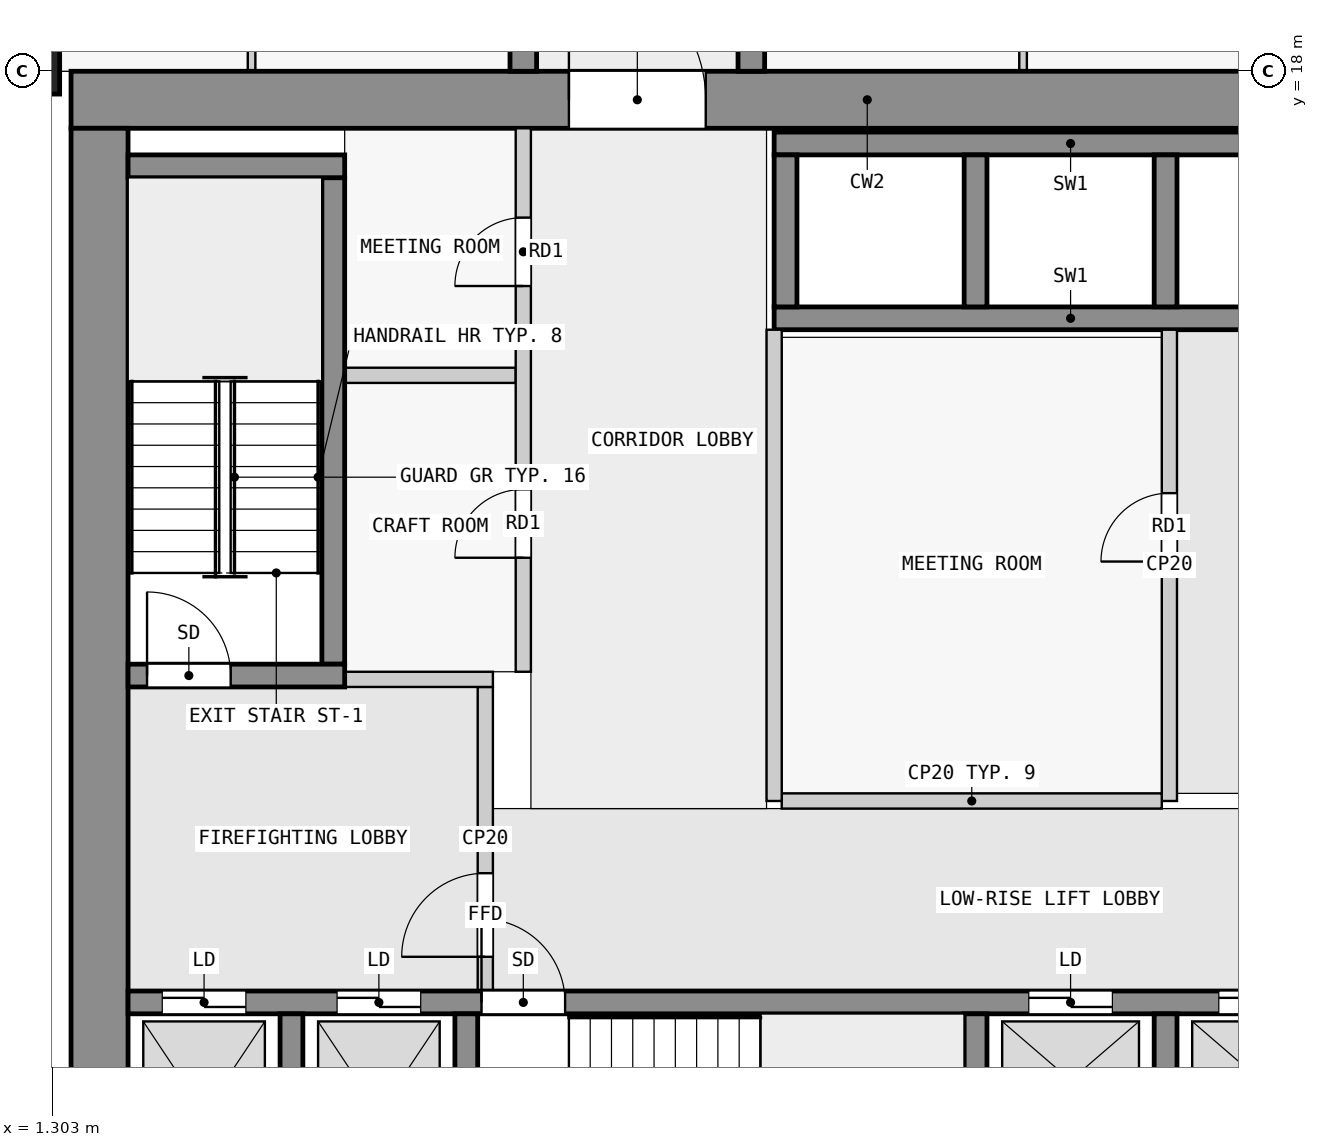
"""IFC4 building model, lengths in metres.
Left out: names, types, materials, properties, quantities, classifications, styles, units other than length and angle.
Written with IfcOpenShell. Run it as: python <this file> out.ifc"""

import sys

from ifc_helpers import new_model, si_unit, direction, frame, frame_2d, origin, origin_2d, place, context, subcontext, project, spatial, rectangle, extrude, element, fill, save


model = new_model("IFC4")
c1 = context("Model", 3, precision=1e-05, world=origin(), true_north=direction((0.0, 1.0)))
c2 = subcontext(c1, "Body", "Model", "MODEL_VIEW")
j1 = project(units=[si_unit("LENGTHUNIT", "METRE"), si_unit("PLANEANGLEUNIT", "RADIAN")], contexts=[c1])
p1 = place(None, origin())
s1 = spatial("IfcSite", under=j1, at=p1, CompositionType="ELEMENT")
p2 = place(p1, origin())
s2 = spatial("IfcBuilding", under=s1, at=p2, CompositionType="ELEMENT")
p3 = place(p2, frame((0.0, 0.0, 51.3)))
s3 = spatial("IfcBuildingStorey", under=s2, at=p3, CompositionType="ELEMENT", Elevation=51.3)
p4 = place(p3, frame((0.7, 18.0, 0.0), z_axis=(0.0, 0.0, 1.0), x_axis=(0.0, 1.0, 0.0)))
e1 = element("IfcColumn", 1, at=p4, inside=s3, PredefinedType="COLUMN", context=c2, shape_type="SweptSolid", body=[
    extrude(rectangle(XDim=0.6, YDim=1.4, at=origin_2d()), origin(), (0.0, 0.0, 1.0), 3.5),
])
p5 = place(p3, frame((1.55, 17.625, 0.0), z_axis=(0.0, 0.0, 1.0), x_axis=(1.0, 0.0, 0.0)))
e2 = element("IfcWall", 2, at=p5, inside=s3, PredefinedType="SHEAR", context=c2, shape_type="SweptSolid", body=[
    extrude(rectangle(XDim=20.95, YDim=0.75, at=frame_2d((10.475, 0.0))), origin(), (0.0, 0.0, 1.0), 3.25),
])
p6 = place(p5, frame((6.55, 0.0, 0.0)))
e3 = element("IfcOpeningElement", 3, at=p6, cuts=e2, PredefinedType="OPENING", context=c2, shape_type="SweptSolid", body=[
    extrude(rectangle(XDim=1.8, YDim=2.1, at=frame_2d((0.9, 1.05))), frame((0.0, 0.385, 0.0), z_axis=(0.0, -1.0, 0.0), x_axis=(1.0, 0.0, 0.0)), (0.0, 0.0, 1.0), 0.77),
])
p7 = place(p3, frame((1.925, 2.5, 0.0), z_axis=(0.0, 0.0, 1.0), x_axis=(0.0, 1.0, 0.0)))
e4 = element("IfcWall", 4, at=p7, inside=s3, PredefinedType="SHEAR", context=c2, shape_type="SweptSolid", body=[
    extrude(rectangle(XDim=14.75, YDim=0.75, at=frame_2d((7.375, 0.0))), origin(), (0.0, 0.0, 1.0), 3.25),
])
for number, where, z_axis, x_axis in (
    (5, (4.45, 2.8, 0.0), (0.0, 0.0, 1.0), (0.0, 1.0, 0.0)),
    (6, (6.75, 2.8, 0.0), (0.0, 0.0, 1.0), (0.0, 1.0, 0.0)),
    (7, (13.45, 2.8, 0.0), (0.0, 0.0, 1.0), (0.0, 1.0, 0.0)),
    (8, (15.95, 2.8, 0.0), (0.0, 0.0, 1.0), (0.0, 1.0, 0.0)),
):
    element("IfcWall", number, at=place(p3, frame(where, z_axis=z_axis, x_axis=x_axis)), inside=s3, PredefinedType="SHEAR", context=c2, shape_type="SweptSolid", body=[
        extrude(rectangle(XDim=2.8, YDim=0.3, at=frame_2d((1.4, 0.0))), origin(), (0.0, 0.0, 1.0), 3.25),
    ])
p8 = place(p3, frame((2.3, 5.75, 0.0), z_axis=(0.0, 0.0, 1.0), x_axis=(1.0, 0.0, 0.0)))
e9 = element("IfcWall", 9, at=p8, inside=s3, PredefinedType="SHEAR", context=c2, shape_type="SweptSolid", body=[
    extrude(rectangle(XDim=18.8, YDim=0.3, at=frame_2d((9.4, 0.0))), origin(), (0.0, 0.0, 1.0), 3.25),
])
p9 = place(p8, frame((4.65, 0.0, 0.0)))
e10 = element("IfcOpeningElement", 10, at=p9, cuts=e9, PredefinedType="OPENING", context=c2, shape_type="SweptSolid", body=[
    extrude(rectangle(XDim=1.1, YDim=2.1, at=frame_2d((0.55, 1.05))), frame((0.0, 0.16, 0.0), z_axis=(0.0, -1.0, 0.0), x_axis=(1.0, 0.0, 0.0)), (0.0, 0.0, 1.0), 0.32),
])
p10 = place(p8, frame((0.45, 0.0, 0.0)))
e11 = element("IfcOpeningElement", 11, at=p10, cuts=e9, PredefinedType="OPENING", context=c2, shape_type="SweptSolid", body=[
    extrude(rectangle(XDim=1.1, YDim=2.1, at=frame_2d((0.55, 1.05))), frame((0.0, 0.16, 0.0), z_axis=(0.0, -1.0, 0.0), x_axis=(1.0, 0.0, 0.0)), (0.0, 0.0, 1.0), 0.32),
])
p11 = place(p8, frame((2.75, 0.0, 0.0)))
e12 = element("IfcOpeningElement", 12, at=p11, cuts=e9, PredefinedType="OPENING", context=c2, shape_type="SweptSolid", body=[
    extrude(rectangle(XDim=1.1, YDim=2.1, at=frame_2d((0.55, 1.05))), frame((0.0, 0.16, 0.0), z_axis=(0.0, -1.0, 0.0), x_axis=(1.0, 0.0, 0.0)), (0.0, 0.0, 1.0), 0.32),
])
p12 = place(p8, frame((11.85, 0.0, 0.0)))
e13 = element("IfcOpeningElement", 13, at=p12, cuts=e9, PredefinedType="OPENING", context=c2, shape_type="SweptSolid", body=[
    extrude(rectangle(XDim=1.1, YDim=2.1, at=frame_2d((0.55, 1.05))), frame((0.0, 0.16, 0.0), z_axis=(0.0, -1.0, 0.0), x_axis=(1.0, 0.0, 0.0)), (0.0, 0.0, 1.0), 0.32),
])
p13 = place(p8, frame((14.35, 0.0, 0.0)))
e14 = element("IfcOpeningElement", 14, at=p13, cuts=e9, PredefinedType="OPENING", context=c2, shape_type="SweptSolid", body=[
    extrude(rectangle(XDim=1.1, YDim=2.1, at=frame_2d((0.55, 1.05))), frame((0.0, 0.16, 0.0), z_axis=(0.0, -1.0, 0.0), x_axis=(1.0, 0.0, 0.0)), (0.0, 0.0, 1.0), 0.32),
])
p14 = place(p8, frame((16.85, 0.0, 0.0)))
e15 = element("IfcOpeningElement", 15, at=p14, cuts=e9, PredefinedType="OPENING", context=c2, shape_type="SweptSolid", body=[
    extrude(rectangle(XDim=1.1, YDim=2.1, at=frame_2d((0.55, 1.05))), frame((0.0, 0.16, 0.0), z_axis=(0.0, -1.0, 0.0), x_axis=(1.0, 0.0, 0.0)), (0.0, 0.0, 1.0), 0.32),
])
p15 = place(p3, frame((2.3, 10.05, 0.0), z_axis=(0.0, 0.0, 1.0), x_axis=(1.0, 0.0, 0.0)))
e16 = element("IfcWall", 16, at=p15, inside=s3, PredefinedType="SHEAR", context=c2, shape_type="SweptSolid", body=[
    extrude(rectangle(XDim=2.85, YDim=0.3, at=frame_2d((1.425, 0.0))), origin(), (0.0, 0.0, 1.0), 3.25),
])
p16 = place(p15, frame((0.25, 0.0, 0.0)))
e17 = element("IfcOpeningElement", 17, at=p16, cuts=e16, PredefinedType="OPENING", context=c2, shape_type="SweptSolid", body=[
    extrude(rectangle(XDim=1.1, YDim=2.1, at=frame_2d((0.55, 1.05))), frame((0.0, 0.16, 0.0), z_axis=(0.0, -1.0, 0.0), x_axis=(1.0, 0.0, 0.0)), (0.0, 0.0, 1.0), 0.32),
])
p17 = place(p3, frame((5.0, 10.2, 0.0), z_axis=(0.0, 0.0, 1.0), x_axis=(0.0, 1.0, 0.0)))
e18 = element("IfcWall", 18, at=p17, inside=s3, PredefinedType="SHEAR", context=c2, shape_type="SweptSolid", body=[
    extrude(rectangle(XDim=6.4, YDim=0.3, at=frame_2d((3.2, 0.0))), origin(), (0.0, 0.0, 1.0), 3.25),
])
p18 = place(p3, frame((2.3, 16.75, 0.0), z_axis=(0.0, 0.0, 1.0), x_axis=(1.0, 0.0, 0.0)))
e19 = element("IfcWall", 19, at=p18, inside=s3, PredefinedType="SHEAR", context=c2, shape_type="SweptSolid", body=[
    extrude(rectangle(XDim=2.85, YDim=0.3, at=frame_2d((1.425, 0.0))), origin(), (0.0, 0.0, 1.0), 3.25),
])
for number, where, z_axis, x_axis in (
    (20, (10.8, 17.05, 0.0), (0.0, 0.0, 1.0), (1.0, 0.0, 0.0)),
    (21, (10.8, 14.75, 0.0), (0.0, 0.0, 1.0), (1.0, 0.0, 0.0)),
):
    element("IfcWall", number, at=place(p3, frame(where, z_axis=z_axis, x_axis=x_axis)), inside=s3, PredefinedType="SHEAR", context=c2, shape_type="SweptSolid", body=[
        extrude(rectangle(XDim=7.8, YDim=0.3, at=frame_2d((3.9, 0.0))), origin(), (0.0, 0.0, 1.0), 3.25),
    ])
for number, where, z_axis, x_axis in (
    (22, (10.95, 14.9, 0.0), (0.0, 0.0, 1.0), (0.0, 1.0, 0.0)),
    (23, (13.45, 14.9, 0.0), (0.0, 0.0, 1.0), (0.0, 1.0, 0.0)),
    (24, (15.95, 14.9, 0.0), (0.0, 0.0, 1.0), (0.0, 1.0, 0.0)),
):
    element("IfcWall", number, at=place(p3, frame(where, z_axis=z_axis, x_axis=x_axis)), inside=s3, PredefinedType="SHEAR", context=c2, shape_type="SweptSolid", body=[
        extrude(rectangle(XDim=2.0, YDim=0.3, at=frame_2d((1.0, 0.0))), origin(), (0.0, 0.0, 1.0), 3.25),
    ])
p19 = place(p3, frame((7.5, 18.0, 0.0), z_axis=(0.0, 0.0, 1.0), x_axis=(0.0, 1.0, 0.0)))
e25 = element("IfcWall", 25, at=p19, inside=s3, PredefinedType="SHEAR", context=c2, shape_type="SweptSolid", body=[
    extrude(rectangle(XDim=27.0, YDim=0.35, at=frame_2d((13.5, 0.0))), origin(), (0.0, 0.0, 1.0), 3.25),
])
p20 = place(p19, frame((4.75, 0.0, 0.0)))
e26 = element("IfcOpeningElement", 26, at=p20, cuts=e25, PredefinedType="OPENING", context=c2, shape_type="SweptSolid", body=[
    extrude(rectangle(XDim=1.0, YDim=2.1, at=frame_2d((0.5, 1.05))), frame((0.0, 0.185, 0.0), z_axis=(0.0, -1.0, 0.0), x_axis=(1.0, 0.0, 0.0)), (0.0, 0.0, 1.0), 0.37),
])
p21 = place(p19, frame((15.25, 0.0, 0.0)))
e27 = element("IfcOpeningElement", 27, at=p21, cuts=e25, PredefinedType="OPENING", context=c2, shape_type="SweptSolid", body=[
    extrude(rectangle(XDim=1.0, YDim=2.1, at=frame_2d((0.5, 1.05))), frame((0.0, 0.185, 0.0), z_axis=(0.0, -1.0, 0.0), x_axis=(1.0, 0.0, 0.0)), (0.0, 0.0, 1.0), 0.37),
])
p22 = place(p19, frame((19.75, 0.0, 0.0)))
e28 = element("IfcOpeningElement", 28, at=p22, cuts=e25, PredefinedType="OPENING", context=c2, shape_type="SweptSolid", body=[
    extrude(rectangle(XDim=1.0, YDim=2.1, at=frame_2d((0.5, 1.05))), frame((0.0, 0.185, 0.0), z_axis=(0.0, -1.0, 0.0), x_axis=(1.0, 0.0, 0.0)), (0.0, 0.0, 1.0), 0.37),
])
p23 = place(p19, frame((23.25, 0.0, 0.0)))
e29 = element("IfcOpeningElement", 29, at=p23, cuts=e25, PredefinedType="OPENING", context=c2, shape_type="SweptSolid", body=[
    extrude(rectangle(XDim=0.9, YDim=2.1, at=frame_2d((0.45, 1.05))), frame((0.0, 0.185, 0.0), z_axis=(0.0, -1.0, 0.0), x_axis=(1.0, 0.0, 0.0)), (0.0, 0.0, 1.0), 0.37),
])
p24 = place(p19, frame((25.45, 0.0, 0.0)))
e30 = element("IfcOpeningElement", 30, at=p24, cuts=e25, PredefinedType="OPENING", context=c2, shape_type="SweptSolid", body=[
    extrude(rectangle(XDim=1.0, YDim=2.1, at=frame_2d((0.5, 1.05))), frame((0.0, 0.185, 0.0), z_axis=(0.0, -1.0, 0.0), x_axis=(1.0, 0.0, 0.0)), (0.0, 0.0, 1.0), 0.37),
])
p25 = place(p3, frame((10.5, 18.0, 0.0), z_axis=(0.0, 0.0, 1.0), x_axis=(0.0, 1.0, 0.0)))
e31 = element("IfcWall", 31, at=p25, inside=s3, PredefinedType="SHEAR", context=c2, shape_type="SweptSolid", body=[
    extrude(rectangle(XDim=27.0, YDim=0.35, at=frame_2d((13.5, 0.0))), origin(), (0.0, 0.0, 1.0), 3.25),
])
p26 = place(p25, frame((1.75, 0.0, 0.0)))
e32 = element("IfcOpeningElement", 32, at=p26, cuts=e31, PredefinedType="OPENING", context=c2, shape_type="SweptSolid", body=[
    extrude(rectangle(XDim=1.0, YDim=2.1, at=frame_2d((0.5, 1.05))), frame((0.0, 0.185, 0.0), z_axis=(0.0, -1.0, 0.0), x_axis=(1.0, 0.0, 0.0)), (0.0, 0.0, 1.0), 0.37),
])
p27 = place(p25, frame((6.25, 0.0, 0.0)))
e33 = element("IfcOpeningElement", 33, at=p27, cuts=e31, PredefinedType="OPENING", context=c2, shape_type="SweptSolid", body=[
    extrude(rectangle(XDim=1.0, YDim=2.1, at=frame_2d((0.5, 1.05))), frame((0.0, 0.185, 0.0), z_axis=(0.0, -1.0, 0.0), x_axis=(1.0, 0.0, 0.0)), (0.0, 0.0, 1.0), 0.37),
])
p28 = place(p25, frame((10.75, 0.0, 0.0)))
e34 = element("IfcOpeningElement", 34, at=p28, cuts=e31, PredefinedType="OPENING", context=c2, shape_type="SweptSolid", body=[
    extrude(rectangle(XDim=1.0, YDim=2.1, at=frame_2d((0.5, 1.05))), frame((0.0, 0.185, 0.0), z_axis=(0.0, -1.0, 0.0), x_axis=(1.0, 0.0, 0.0)), (0.0, 0.0, 1.0), 0.37),
])
p29 = place(p25, frame((15.25, 0.0, 0.0)))
e35 = element("IfcOpeningElement", 35, at=p29, cuts=e31, PredefinedType="OPENING", context=c2, shape_type="SweptSolid", body=[
    extrude(rectangle(XDim=1.0, YDim=2.1, at=frame_2d((0.5, 1.05))), frame((0.0, 0.185, 0.0), z_axis=(0.0, -1.0, 0.0), x_axis=(1.0, 0.0, 0.0)), (0.0, 0.0, 1.0), 0.37),
])
p30 = place(p25, frame((21.35, 0.0, 0.0)))
e36 = element("IfcOpeningElement", 36, at=p30, cuts=e31, PredefinedType="OPENING", context=c2, shape_type="SweptSolid", body=[
    extrude(rectangle(XDim=1.0, YDim=2.1, at=frame_2d((0.5, 1.05))), frame((0.0, 0.185, 0.0), z_axis=(0.0, -1.0, 0.0), x_axis=(1.0, 0.0, 0.0)), (0.0, 0.0, 1.0), 0.37),
])
p31 = place(p3, frame((7.0, 5.9, 0.0), z_axis=(0.0, 0.0, 1.0), x_axis=(0.0, 1.0, 0.0)))
e37 = element("IfcWall", 37, at=p31, inside=s3, PredefinedType="PARTITIONING", context=c2, shape_type="SweptSolid", body=[
    extrude(rectangle(XDim=4.0, YDim=0.2, at=frame_2d((2.0, 0.0))), origin(), (0.0, 0.0, 1.0), 3.25),
])
p32 = place(p31, frame((0.45, 0.0, 0.0)))
e38 = element("IfcOpeningElement", 38, at=p32, cuts=e37, PredefinedType="OPENING", context=c2, shape_type="SweptSolid", body=[
    extrude(rectangle(XDim=1.1, YDim=2.1, at=frame_2d((0.55, 1.05))), frame((0.0, 0.11, 0.0), z_axis=(0.0, -1.0, 0.0), x_axis=(1.0, 0.0, 0.0)), (0.0, 0.0, 1.0), 0.22),
])
p33 = place(p3, frame((5.15, 10.0, 0.0), z_axis=(0.0, 0.0, 1.0), x_axis=(1.0, 0.0, 0.0)))
e39 = element("IfcWall", 39, at=p33, inside=s3, PredefinedType="PARTITIONING", context=c2, shape_type="SweptSolid", body=[
    extrude(rectangle(XDim=1.95, YDim=0.2, at=frame_2d((0.975, 0.0))), origin(), (0.0, 0.0, 1.0), 3.25),
])
p34 = place(p3, frame((10.8, 8.4, 0.0), z_axis=(0.0, 0.0, 1.0), x_axis=(0.0, 1.0, 0.0)))
e40 = element("IfcWall", 40, at=p34, inside=s3, PredefinedType="PARTITIONING", context=c2, shape_type="SweptSolid", body=[
    extrude(rectangle(XDim=6.2, YDim=0.2, at=frame_2d((3.1, 0.0))), origin(), (0.0, 0.0, 1.0), 3.25),
])
p35 = place(p3, frame((10.9, 8.4, 0.0), z_axis=(0.0, 0.0, 1.0), x_axis=(1.0, 0.0, 0.0)))
e41 = element("IfcWall", 41, at=p35, inside=s3, PredefinedType="PARTITIONING", context=c2, shape_type="SweptSolid", body=[
    extrude(rectangle(XDim=5.0, YDim=0.2, at=frame_2d((2.5, 0.0))), origin(), (0.0, 0.0, 1.0), 3.25),
])
p36 = place(p3, frame((16.0, 8.4, 0.0), z_axis=(0.0, 0.0, 1.0), x_axis=(0.0, 1.0, 0.0)))
e42 = element("IfcWall", 42, at=p36, inside=s3, PredefinedType="PARTITIONING", context=c2, shape_type="SweptSolid", body=[
    extrude(rectangle(XDim=6.2, YDim=0.2, at=frame_2d((3.1, 0.0))), origin(), (0.0, 0.0, 1.0), 3.25),
])
p37 = place(p36, frame((3.15, 0.0, 0.0)))
e43 = element("IfcOpeningElement", 43, at=p37, cuts=e42, PredefinedType="OPENING", context=c2, shape_type="SweptSolid", body=[
    extrude(rectangle(XDim=0.9, YDim=2.1, at=frame_2d((0.45, 1.05))), frame((0.0, 0.11, 0.0), z_axis=(0.0, -1.0, 0.0), x_axis=(1.0, 0.0, 0.0)), (0.0, 0.0, 1.0), 0.22),
])
p38 = place(p3, frame((7.5, 10.1, 0.0), z_axis=(0.0, 0.0, 1.0), x_axis=(0.0, 1.0, 0.0)))
e44 = element("IfcWall", 44, at=p38, inside=s3, PredefinedType="PARTITIONING", context=c2, shape_type="SweptSolid", body=[
    extrude(rectangle(XDim=7.15, YDim=0.2, at=frame_2d((3.575, 0.0))), origin(), (0.0, 0.0, 1.0), 3.25),
])
p39 = place(p38, frame((1.5, 0.0, 0.0)))
e45 = element("IfcOpeningElement", 45, at=p39, cuts=e44, PredefinedType="OPENING", context=c2, shape_type="SweptSolid", body=[
    extrude(rectangle(XDim=0.9, YDim=2.1, at=frame_2d((0.45, 1.05))), frame((0.0, 0.11, 0.0), z_axis=(0.0, -1.0, 0.0), x_axis=(1.0, 0.0, 0.0)), (0.0, 0.0, 1.0), 0.22),
])
p40 = place(p38, frame((5.075, 0.0, 0.0)))
e46 = element("IfcOpeningElement", 46, at=p40, cuts=e44, PredefinedType="OPENING", context=c2, shape_type="SweptSolid", body=[
    extrude(rectangle(XDim=0.9, YDim=2.1, at=frame_2d((0.45, 1.05))), frame((0.0, 0.11, 0.0), z_axis=(0.0, -1.0, 0.0), x_axis=(1.0, 0.0, 0.0)), (0.0, 0.0, 1.0), 0.22),
])
p41 = place(p3, frame((5.15, 14.0, 0.0), z_axis=(0.0, 0.0, 1.0), x_axis=(1.0, 0.0, 0.0)))
e47 = element("IfcWall", 47, at=p41, inside=s3, PredefinedType="PARTITIONING", context=c2, shape_type="SweptSolid", body=[
    extrude(rectangle(XDim=2.25, YDim=0.2, at=frame_2d((1.125, 0.0))), origin(), (0.0, 0.0, 1.0), 3.25),
])
p42 = place(p3, frame((3.925, 18.0, 0.0), z_axis=(0.0, 0.0, 1.0), x_axis=(0.0, 1.0, 0.0)))
e48 = element("IfcWall", 48, at=p42, inside=s3, PredefinedType="PARTITIONING", context=c2, shape_type="SweptSolid", body=[
    extrude(rectangle(XDim=9.0, YDim=0.1, at=frame_2d((4.5, 0.0))), origin(), (0.0, 0.0, 1.0), 3.25),
])
p43 = place(p42, frame((1.85, 0.0, 0.0)))
e49 = element("IfcOpeningElement", 49, at=p43, cuts=e48, PredefinedType="OPENING", context=c2, shape_type="SweptSolid", body=[
    extrude(rectangle(XDim=0.9, YDim=2.1, at=frame_2d((0.45, 1.05))), frame((0.0, 0.06, 0.0), z_axis=(0.0, -1.0, 0.0), x_axis=(1.0, 0.0, 0.0)), (0.0, 0.0, 1.0), 0.12),
])
p44 = place(p42, frame((6.25, 0.0, 0.0)))
e50 = element("IfcOpeningElement", 50, at=p44, cuts=e48, PredefinedType="OPENING", context=c2, shape_type="SweptSolid", body=[
    extrude(rectangle(XDim=0.9, YDim=2.1, at=frame_2d((0.45, 1.05))), frame((0.0, 0.06, 0.0), z_axis=(0.0, -1.0, 0.0), x_axis=(1.0, 0.0, 0.0)), (0.0, 0.0, 1.0), 0.12),
])
p45 = place(p3, frame((14.075, 18.0, 0.0), z_axis=(0.0, 0.0, 1.0), x_axis=(0.0, 1.0, 0.0)))
e51 = element("IfcWall", 51, at=p45, inside=s3, PredefinedType="PARTITIONING", context=c2, shape_type="SweptSolid", body=[
    extrude(rectangle(XDim=1.45, YDim=0.1, at=frame_2d((0.725, 0.0))), origin(), (0.0, 0.0, 1.0), 3.25),
])
p46 = place(p32, origin())
e52 = element("IfcDoor", 52, at=p46, inside=s3, OperationType="SINGLE_SWING_LEFT", PredefinedType="DOOR", context=c2, shape_type="SweptSolid", body=[
    extrude(rectangle(XDim=1.1, YDim=2.1, at=frame_2d((0.55, 1.05))), frame((0.0, 0.025, 0.0), z_axis=(0.0, -1.0, 0.0), x_axis=(1.0, 0.0, 0.0)), (0.0, 0.0, 1.0), 0.05),
])
fill(e38, e52)
p47 = place(p16, origin())
e53 = element("IfcDoor", 53, at=p47, inside=s3, OperationType="SINGLE_SWING_RIGHT", PredefinedType="DOOR", context=c2, shape_type="SweptSolid", body=[
    extrude(rectangle(XDim=1.1, YDim=2.1, at=frame_2d((0.55, 1.05))), frame((0.0, 0.025, 0.0), z_axis=(0.0, -1.0, 0.0), x_axis=(1.0, 0.0, 0.0)), (0.0, 0.0, 1.0), 0.05),
])
fill(e17, e53)
p48 = place(p37, origin())
e54 = element("IfcDoor", 54, at=p48, inside=s3, OperationType="SINGLE_SWING_LEFT", PredefinedType="DOOR", context=c2, shape_type="SweptSolid", body=[
    extrude(rectangle(XDim=0.9, YDim=2.1, at=frame_2d((0.45, 1.05))), frame((0.0, 0.025, 0.0), z_axis=(0.0, -1.0, 0.0), x_axis=(1.0, 0.0, 0.0)), (0.0, 0.0, 1.0), 0.05),
])
fill(e43, e54)
p49 = place(p9, origin())
e55 = element("IfcDoor", 55, at=p49, inside=s3, OperationType="SINGLE_SWING_LEFT", PredefinedType="DOOR", context=c2, shape_type="SweptSolid", body=[
    extrude(rectangle(XDim=1.1, YDim=2.1, at=frame_2d((0.55, 1.05))), frame((0.0, 0.025, 0.0), z_axis=(0.0, -1.0, 0.0), x_axis=(1.0, 0.0, 0.0)), (0.0, 0.0, 1.0), 0.05),
])
fill(e10, e55)
p50 = place(p10, origin())
e56 = element("IfcDoor", 56, at=p50, inside=s3, OperationType="DOUBLE_DOOR_SLIDING", PredefinedType="DOOR", context=c2, shape_type="SweptSolid", body=[
    extrude(rectangle(XDim=1.1, YDim=2.1, at=frame_2d((0.55, 1.05))), frame((0.0, 0.025, 0.0), z_axis=(0.0, -1.0, 0.0), x_axis=(1.0, 0.0, 0.0)), (0.0, 0.0, 1.0), 0.05),
])
fill(e11, e56)
p51 = place(p11, origin())
e57 = element("IfcDoor", 57, at=p51, inside=s3, OperationType="DOUBLE_DOOR_SLIDING", PredefinedType="DOOR", context=c2, shape_type="SweptSolid", body=[
    extrude(rectangle(XDim=1.1, YDim=2.1, at=frame_2d((0.55, 1.05))), frame((0.0, 0.025, 0.0), z_axis=(0.0, -1.0, 0.0), x_axis=(1.0, 0.0, 0.0)), (0.0, 0.0, 1.0), 0.05),
])
fill(e12, e57)
p52 = place(p12, origin())
e58 = element("IfcDoor", 58, at=p52, inside=s3, OperationType="DOUBLE_DOOR_SLIDING", PredefinedType="DOOR", context=c2, shape_type="SweptSolid", body=[
    extrude(rectangle(XDim=1.1, YDim=2.1, at=frame_2d((0.55, 1.05))), frame((0.0, 0.025, 0.0), z_axis=(0.0, -1.0, 0.0), x_axis=(1.0, 0.0, 0.0)), (0.0, 0.0, 1.0), 0.05),
])
fill(e13, e58)
p53 = place(p13, origin())
e59 = element("IfcDoor", 59, at=p53, inside=s3, OperationType="DOUBLE_DOOR_SLIDING", PredefinedType="DOOR", context=c2, shape_type="SweptSolid", body=[
    extrude(rectangle(XDim=1.1, YDim=2.1, at=frame_2d((0.55, 1.05))), frame((0.0, 0.025, 0.0), z_axis=(0.0, -1.0, 0.0), x_axis=(1.0, 0.0, 0.0)), (0.0, 0.0, 1.0), 0.05),
])
fill(e14, e59)
p54 = place(p6, origin())
e60 = element("IfcDoor", 60, at=p54, inside=s3, OperationType="DOUBLE_DOOR_SINGLE_SWING", PredefinedType="DOOR", context=c2, shape_type="SweptSolid", body=[
    extrude(rectangle(XDim=1.8, YDim=2.1, at=frame_2d((0.9, 1.05))), frame((0.0, 0.025, 0.0), z_axis=(0.0, -1.0, 0.0), x_axis=(1.0, 0.0, 0.0)), (0.0, 0.0, 1.0), 0.05),
])
fill(e3, e60)
p55 = place(p39, origin())
e61 = element("IfcDoor", 61, at=p55, inside=s3, OperationType="SINGLE_SWING_RIGHT", PredefinedType="DOOR", context=c2, shape_type="SweptSolid", body=[
    extrude(rectangle(XDim=0.9, YDim=2.1, at=frame_2d((0.45, 1.05))), frame((0.0, 0.025, 0.0), z_axis=(0.0, -1.0, 0.0), x_axis=(1.0, 0.0, 0.0)), (0.0, 0.0, 1.0), 0.05),
])
fill(e45, e61)
p56 = place(p40, origin())
e62 = element("IfcDoor", 62, at=p56, inside=s3, OperationType="SINGLE_SWING_RIGHT", PredefinedType="DOOR", context=c2, shape_type="SweptSolid", body=[
    extrude(rectangle(XDim=0.9, YDim=2.1, at=frame_2d((0.45, 1.05))), frame((0.0, 0.025, 0.0), z_axis=(0.0, -1.0, 0.0), x_axis=(1.0, 0.0, 0.0)), (0.0, 0.0, 1.0), 0.05),
])
fill(e46, e62)
save(model, sys.argv[1])
